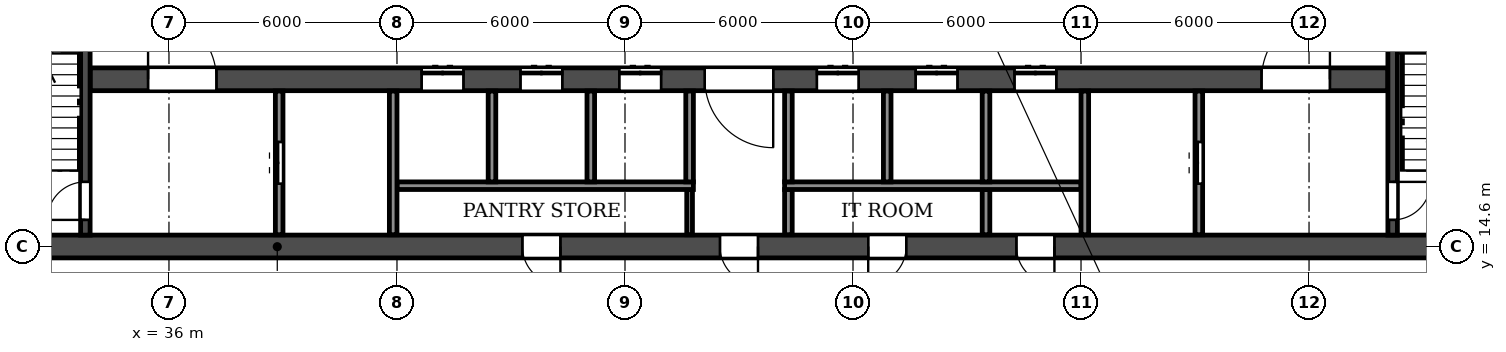
"""IFC4 building model, lengths in metres.
Left out: names, types, materials, properties, quantities, classifications, styles, units other than length and angle.
Written with IfcOpenShell. Run it as: python <this file> out.ifc"""

import sys

from ifc_helpers import new_model, si_unit, direction, frame, frame_2d, origin, place, context, subcontext, project, spatial, rectangle, extrude, element, fill, save


model = new_model("IFC4")
c1 = context("Model", 3, precision=1e-05, world=origin(), true_north=direction((0.0, 1.0)))
c2 = subcontext(c1, "Body", "Model", "MODEL_VIEW")
j1 = project(units=[si_unit("LENGTHUNIT", "METRE"), si_unit("PLANEANGLEUNIT", "RADIAN")], contexts=[c1])
p1 = place(None, origin())
s1 = spatial("IfcSite", under=j1, at=p1, CompositionType="ELEMENT")
p2 = place(p1, origin())
s2 = spatial("IfcBuilding", under=s1, at=p2, CompositionType="ELEMENT")
p3 = place(p2, frame((0.0, 0.0, 49.8)))
s3 = spatial("IfcBuildingStorey", under=s2, at=p3, CompositionType="ELEMENT", Elevation=49.8)
p4 = place(p3, frame((2.6, 14.6, 0.0), z_axis=(0.0, 0.0, 1.0), x_axis=(1.0, 0.0, 0.0)))
e1 = element("IfcWall", 1, at=p4, inside=s3, PredefinedType="SOLIDWALL", context=c2, shape_type="SweptSolid", body=[
    extrude(rectangle(XDim=96.8, YDim=0.6, at=frame_2d((48.4, 0.0))), origin(), (0.0, 0.0, 1.0), 3.0),
])
p5 = place(p4, frame((3.05, 0.0, 0.0)))
e2 = element("IfcOpeningElement", 2, at=p5, cuts=e1, PredefinedType="OPENING", context=c2, shape_type="SweptSolid", body=[
    extrude(rectangle(XDim=1.5, YDim=2.1, at=frame_2d((0.75, 1.05))), frame((0.0, 0.31, 0.0), z_axis=(0.0, -1.0, 0.0), x_axis=(1.0, 0.0, 0.0)), (0.0, 0.0, 1.0), 0.62),
])
p6 = place(p4, frame((10.75, 0.0, 0.0)))
e3 = element("IfcOpeningElement", 3, at=p6, cuts=e1, PredefinedType="OPENING", context=c2, shape_type="SweptSolid", body=[
    extrude(rectangle(XDim=1.5, YDim=2.1, at=frame_2d((0.75, 1.05))), frame((0.0, 0.31, 0.0), z_axis=(0.0, -1.0, 0.0), x_axis=(1.0, 0.0, 0.0)), (0.0, 0.0, 1.0), 0.62),
])
p7 = place(p4, frame((16.3, 0.0, 0.0)))
e4 = element("IfcOpeningElement", 4, at=p7, cuts=e1, PredefinedType="OPENING", context=c2, shape_type="SweptSolid", body=[
    extrude(rectangle(XDim=1.0, YDim=2.1, at=frame_2d((0.5, 1.05))), frame((0.0, 0.31, 0.0), z_axis=(0.0, -1.0, 0.0), x_axis=(1.0, 0.0, 0.0)), (0.0, 0.0, 1.0), 0.62),
])
p8 = place(p4, frame((24.2, 0.0, 0.0)))
e5 = element("IfcOpeningElement", 5, at=p8, cuts=e1, PredefinedType="OPENING", context=c2, shape_type="SweptSolid", body=[
    extrude(rectangle(XDim=1.0, YDim=2.1, at=frame_2d((0.5, 1.05))), frame((0.0, 0.31, 0.0), z_axis=(0.0, -1.0, 0.0), x_axis=(1.0, 0.0, 0.0)), (0.0, 0.0, 1.0), 0.62),
])
p9 = place(p4, frame((28.8, 0.0, 0.0)))
e6 = element("IfcOpeningElement", 6, at=p9, cuts=e1, PredefinedType="OPENING", context=c2, shape_type="SweptSolid", body=[
    extrude(rectangle(XDim=1.0, YDim=2.1, at=frame_2d((0.5, 1.05))), frame((0.0, 0.31, 0.0), z_axis=(0.0, -1.0, 0.0), x_axis=(1.0, 0.0, 0.0)), (0.0, 0.0, 1.0), 0.62),
])
p10 = place(p4, frame((42.7, 0.0, 0.0)))
e7 = element("IfcOpeningElement", 7, at=p10, cuts=e1, PredefinedType="OPENING", context=c2, shape_type="SweptSolid", body=[
    extrude(rectangle(XDim=1.0, YDim=2.1, at=frame_2d((0.5, 1.05))), frame((0.0, 0.31, 0.0), z_axis=(0.0, -1.0, 0.0), x_axis=(1.0, 0.0, 0.0)), (0.0, 0.0, 1.0), 0.62),
])
p11 = place(p4, frame((47.9, 0.0, 0.0)))
e8 = element("IfcOpeningElement", 8, at=p11, cuts=e1, PredefinedType="OPENING", context=c2, shape_type="SweptSolid", body=[
    extrude(rectangle(XDim=1.0, YDim=2.1, at=frame_2d((0.5, 1.05))), frame((0.0, 0.31, 0.0), z_axis=(0.0, -1.0, 0.0), x_axis=(1.0, 0.0, 0.0)), (0.0, 0.0, 1.0), 0.62),
])
p12 = place(p4, frame((51.8, 0.0, 0.0)))
e9 = element("IfcOpeningElement", 9, at=p12, cuts=e1, PredefinedType="OPENING", context=c2, shape_type="SweptSolid", body=[
    extrude(rectangle(XDim=1.0, YDim=2.1, at=frame_2d((0.5, 1.05))), frame((0.0, 0.31, 0.0), z_axis=(0.0, -1.0, 0.0), x_axis=(1.0, 0.0, 0.0)), (0.0, 0.0, 1.0), 0.62),
])
p13 = place(p4, frame((55.7, 0.0, 0.0)))
e10 = element("IfcOpeningElement", 10, at=p13, cuts=e1, PredefinedType="OPENING", context=c2, shape_type="SweptSolid", body=[
    extrude(rectangle(XDim=1.0, YDim=2.1, at=frame_2d((0.5, 1.05))), frame((0.0, 0.31, 0.0), z_axis=(0.0, -1.0, 0.0), x_axis=(1.0, 0.0, 0.0)), (0.0, 0.0, 1.0), 0.62),
])
p14 = place(p4, frame((67.0, 0.0, 0.0)))
e11 = element("IfcOpeningElement", 11, at=p14, cuts=e1, PredefinedType="OPENING", context=c2, shape_type="SweptSolid", body=[
    extrude(rectangle(XDim=1.0, YDim=2.1, at=frame_2d((0.5, 1.05))), frame((0.0, 0.31, 0.0), z_axis=(0.0, -1.0, 0.0), x_axis=(1.0, 0.0, 0.0)), (0.0, 0.0, 1.0), 0.62),
])
p15 = place(p4, frame((71.6, 0.0, 0.0)))
e12 = element("IfcOpeningElement", 12, at=p15, cuts=e1, PredefinedType="OPENING", context=c2, shape_type="SweptSolid", body=[
    extrude(rectangle(XDim=1.0, YDim=2.1, at=frame_2d((0.5, 1.05))), frame((0.0, 0.31, 0.0), z_axis=(0.0, -1.0, 0.0), x_axis=(1.0, 0.0, 0.0)), (0.0, 0.0, 1.0), 0.62),
])
p16 = place(p4, frame((79.5, 0.0, 0.0)))
e13 = element("IfcOpeningElement", 13, at=p16, cuts=e1, PredefinedType="OPENING", context=c2, shape_type="SweptSolid", body=[
    extrude(rectangle(XDim=1.0, YDim=2.1, at=frame_2d((0.5, 1.05))), frame((0.0, 0.31, 0.0), z_axis=(0.0, -1.0, 0.0), x_axis=(1.0, 0.0, 0.0)), (0.0, 0.0, 1.0), 0.62),
])
p17 = place(p4, frame((84.05, 0.0, 0.0)))
e14 = element("IfcOpeningElement", 14, at=p17, cuts=e1, PredefinedType="OPENING", context=c2, shape_type="SweptSolid", body=[
    extrude(rectangle(XDim=1.0, YDim=2.1, at=frame_2d((0.5, 1.05))), frame((0.0, 0.31, 0.0), z_axis=(0.0, -1.0, 0.0), x_axis=(1.0, 0.0, 0.0)), (0.0, 0.0, 1.0), 0.62),
])
p18 = place(p4, frame((91.75, 0.0, 0.0)))
e15 = element("IfcOpeningElement", 15, at=p18, cuts=e1, PredefinedType="OPENING", context=c2, shape_type="SweptSolid", body=[
    extrude(rectangle(XDim=1.0, YDim=2.1, at=frame_2d((0.5, 1.05))), frame((0.0, 0.31, 0.0), z_axis=(0.0, -1.0, 0.0), x_axis=(1.0, 0.0, 0.0)), (0.0, 0.0, 1.0), 0.62),
])
p19 = place(p3, frame((33.925, 19.0, 0.0), z_axis=(0.0, 0.0, 1.0), x_axis=(1.0, 0.0, 0.0)))
e16 = element("IfcWall", 16, at=p19, inside=s3, PredefinedType="SOLIDWALL", context=c2, shape_type="SweptSolid", body=[
    extrude(rectangle(XDim=34.15, YDim=0.6, at=frame_2d((17.075, 0.0))), origin(), (0.0, 0.0, 1.0), 3.0),
])
p20 = place(p19, frame((16.175, 0.0, 0.0)))
e17 = element("IfcOpeningElement", 17, at=p20, cuts=e16, PredefinedType="OPENING", context=c2, shape_type="SweptSolid", body=[
    extrude(rectangle(XDim=1.8, YDim=2.1, at=frame_2d((0.9, 1.05))), frame((0.0, 0.31, 0.0), z_axis=(0.0, -1.0, 0.0), x_axis=(1.0, 0.0, 0.0)), (0.0, 0.0, 1.0), 0.62),
])
p21 = place(p19, frame((1.525, 0.0, 0.0)))
e18 = element("IfcOpeningElement", 18, at=p21, cuts=e16, PredefinedType="OPENING", context=c2, shape_type="SweptSolid", body=[
    extrude(rectangle(XDim=1.8, YDim=2.1, at=frame_2d((0.9, 1.05))), frame((0.0, 0.31, 0.0), z_axis=(0.0, -1.0, 0.0), x_axis=(1.0, 0.0, 0.0)), (0.0, 0.0, 1.0), 0.62),
])
p22 = place(p19, frame((8.725, 0.0, 0.0)))
e19 = element("IfcOpeningElement", 19, at=p22, cuts=e16, PredefinedType="OPENING", context=c2, shape_type="SweptSolid", body=[
    extrude(rectangle(XDim=1.1, YDim=2.1, at=frame_2d((0.55, 1.05))), frame((0.0, 0.31, 0.0), z_axis=(0.0, -1.0, 0.0), x_axis=(1.0, 0.0, 0.0)), (0.0, 0.0, 1.0), 0.62),
])
p23 = place(p19, frame((11.325, 0.0, 0.0)))
e20 = element("IfcOpeningElement", 20, at=p23, cuts=e16, PredefinedType="OPENING", context=c2, shape_type="SweptSolid", body=[
    extrude(rectangle(XDim=1.1, YDim=2.1, at=frame_2d((0.55, 1.05))), frame((0.0, 0.31, 0.0), z_axis=(0.0, -1.0, 0.0), x_axis=(1.0, 0.0, 0.0)), (0.0, 0.0, 1.0), 0.62),
])
p24 = place(p19, frame((13.925, 0.0, 0.0)))
e21 = element("IfcOpeningElement", 21, at=p24, cuts=e16, PredefinedType="OPENING", context=c2, shape_type="SweptSolid", body=[
    extrude(rectangle(XDim=1.1, YDim=2.1, at=frame_2d((0.55, 1.05))), frame((0.0, 0.31, 0.0), z_axis=(0.0, -1.0, 0.0), x_axis=(1.0, 0.0, 0.0)), (0.0, 0.0, 1.0), 0.62),
])
p25 = place(p19, frame((19.125, 0.0, 0.0)))
e22 = element("IfcOpeningElement", 22, at=p25, cuts=e16, PredefinedType="OPENING", context=c2, shape_type="SweptSolid", body=[
    extrude(rectangle(XDim=1.1, YDim=2.1, at=frame_2d((0.55, 1.05))), frame((0.0, 0.31, 0.0), z_axis=(0.0, -1.0, 0.0), x_axis=(1.0, 0.0, 0.0)), (0.0, 0.0, 1.0), 0.62),
])
p26 = place(p19, frame((21.725, 0.0, 0.0)))
e23 = element("IfcOpeningElement", 23, at=p26, cuts=e16, PredefinedType="OPENING", context=c2, shape_type="SweptSolid", body=[
    extrude(rectangle(XDim=1.1, YDim=2.1, at=frame_2d((0.55, 1.05))), frame((0.0, 0.31, 0.0), z_axis=(0.0, -1.0, 0.0), x_axis=(1.0, 0.0, 0.0)), (0.0, 0.0, 1.0), 0.62),
])
p27 = place(p19, frame((24.325, 0.0, 0.0)))
e24 = element("IfcOpeningElement", 24, at=p27, cuts=e16, PredefinedType="OPENING", context=c2, shape_type="SweptSolid", body=[
    extrude(rectangle(XDim=1.1, YDim=2.1, at=frame_2d((0.55, 1.05))), frame((0.0, 0.31, 0.0), z_axis=(0.0, -1.0, 0.0), x_axis=(1.0, 0.0, 0.0)), (0.0, 0.0, 1.0), 0.62),
])
p28 = place(p19, frame((30.825, 0.0, 0.0)))
e25 = element("IfcOpeningElement", 25, at=p28, cuts=e16, PredefinedType="OPENING", context=c2, shape_type="SweptSolid", body=[
    extrude(rectangle(XDim=1.8, YDim=2.1, at=frame_2d((0.9, 1.05))), frame((0.0, 0.31, 0.0), z_axis=(0.0, -1.0, 0.0), x_axis=(1.0, 0.0, 0.0)), (0.0, 0.0, 1.0), 0.62),
])
p29 = place(p3, frame((33.8, 14.9, 0.0), z_axis=(0.0, 0.0, 1.0), x_axis=(0.0, 1.0, 0.0)))
e26 = element("IfcWall", 26, at=p29, inside=s3, PredefinedType="SOLIDWALL", context=c2, shape_type="SweptSolid", body=[
    extrude(rectangle(XDim=7.575, YDim=0.25, at=frame_2d((3.788, 0.0))), origin(), (0.0, 0.0, 1.0), 3.0),
])
p30 = place(p29, frame((0.4, 0.0, 0.0)))
e27 = element("IfcOpeningElement", 27, at=p30, cuts=e26, PredefinedType="OPENING", context=c2, shape_type="SweptSolid", body=[
    extrude(rectangle(XDim=1.0, YDim=2.1, at=frame_2d((0.5, 1.05))), frame((0.0, 0.135, 0.0), z_axis=(0.0, -1.0, 0.0), x_axis=(1.0, 0.0, 0.0)), (0.0, 0.0, 1.0), 0.27),
])
p31 = place(p3, frame((68.2, 14.9, 0.0), z_axis=(0.0, 0.0, 1.0), x_axis=(0.0, 1.0, 0.0)))
e28 = element("IfcWall", 28, at=p31, inside=s3, PredefinedType="SOLIDWALL", context=c2, shape_type="SweptSolid", body=[
    extrude(rectangle(XDim=7.575, YDim=0.25, at=frame_2d((3.788, 0.0))), origin(), (0.0, 0.0, 1.0), 3.0),
])
p32 = place(p31, frame((0.4, 0.0, 0.0)))
e29 = element("IfcOpeningElement", 29, at=p32, cuts=e28, PredefinedType="OPENING", context=c2, shape_type="SweptSolid", body=[
    extrude(rectangle(XDim=1.0, YDim=2.1, at=frame_2d((0.5, 1.05))), frame((0.0, 0.135, 0.0), z_axis=(0.0, -1.0, 0.0), x_axis=(1.0, 0.0, 0.0)), (0.0, 0.0, 1.0), 0.27),
])
p33 = place(p3, frame((49.7, 14.91, 0.0), z_axis=(0.0, 0.0, 1.0), x_axis=(0.0, 1.0, 0.0)))
e30 = element("IfcWall", 30, at=p33, inside=s3, PredefinedType="PARTITIONING", context=c2, shape_type="SweptSolid", body=[
    extrude(rectangle(XDim=1.19, YDim=0.15, at=frame_2d((0.595, 0.0))), origin(), (0.0, 0.0, 1.0), 3.0),
])
for number, where, z_axis, x_axis in (
    (31, (52.3, 14.91, 0.0), (0.0, 0.0, 1.0), (0.0, 1.0, 0.0)),
    (32, (57.5, 14.91, 0.0), (0.0, 0.0, 1.0), (0.0, 1.0, 0.0)),
):
    element("IfcWall", number, at=place(p3, frame(where, z_axis=z_axis, x_axis=x_axis)), inside=s3, PredefinedType="PARTITIONING", context=c2, shape_type="SweptSolid", body=[
        extrude(rectangle(XDim=1.19, YDim=0.2, at=frame_2d((0.595, 0.0))), origin(), (0.0, 0.0, 1.0), 3.0),
    ])
for number, where, z_axis, x_axis in (
    (33, (42.0, 16.2, 0.0), (0.0, 0.0, 1.0), (1.0, 0.0, 0.0)),
    (34, (52.2, 16.2, 0.0), (0.0, 0.0, 1.0), (1.0, 0.0, 0.0)),
):
    element("IfcWall", number, at=place(p3, frame(where, z_axis=z_axis, x_axis=x_axis)), inside=s3, PredefinedType="PARTITIONING", context=c2, shape_type="SweptSolid", body=[
        extrude(rectangle(XDim=7.8, YDim=0.2, at=frame_2d((3.9, 0.0))), origin(), (0.0, 0.0, 1.0), 3.0),
    ])
p34 = place(p3, frame((38.9, 14.91, 0.0), z_axis=(0.0, 0.0, 1.0), x_axis=(0.0, 1.0, 0.0)))
e35 = element("IfcWall", 35, at=p34, inside=s3, PredefinedType="PARTITIONING", context=c2, shape_type="SweptSolid", body=[
    extrude(rectangle(XDim=3.78, YDim=0.2, at=frame_2d((1.89, 0.0))), origin(), (0.0, 0.0, 1.0), 3.0),
])
p35 = place(p34, frame((1.34, 0.0, 0.0)))
e36 = element("IfcOpeningElement", 36, at=p35, cuts=e35, PredefinedType="OPENING", context=c2, shape_type="SweptSolid", body=[
    extrude(rectangle(XDim=1.1, YDim=2.1, at=frame_2d((0.55, 1.05))), frame((0.0, 0.11, 0.0), z_axis=(0.0, -1.0, 0.0), x_axis=(1.0, 0.0, 0.0)), (0.0, 0.0, 1.0), 0.22),
])
p36 = place(p3, frame((41.9, 14.91, 0.0), z_axis=(0.0, 0.0, 1.0), x_axis=(0.0, 1.0, 0.0)))
e37 = element("IfcWall", 37, at=p36, inside=s3, PredefinedType="PARTITIONING", context=c2, shape_type="SweptSolid", body=[
    extrude(rectangle(XDim=3.78, YDim=0.2, at=frame_2d((1.89, 0.0))), origin(), (0.0, 0.0, 1.0), 3.0),
])
for number, where, z_axis, x_axis in (
    (38, (44.5, 16.3, 0.0), (0.0, 0.0, 1.0), (0.0, 1.0, 0.0)),
    (39, (47.1, 16.3, 0.0), (0.0, 0.0, 1.0), (0.0, 1.0, 0.0)),
    (40, (49.7, 16.3, 0.0), (0.0, 0.0, 1.0), (0.0, 1.0, 0.0)),
    (41, (52.3, 16.3, 0.0), (0.0, 0.0, 1.0), (0.0, 1.0, 0.0)),
    (42, (54.9, 16.3, 0.0), (0.0, 0.0, 1.0), (0.0, 1.0, 0.0)),
    (43, (57.5, 16.3, 0.0), (0.0, 0.0, 1.0), (0.0, 1.0, 0.0)),
):
    element("IfcWall", number, at=place(p3, frame(where, z_axis=z_axis, x_axis=x_axis)), inside=s3, PredefinedType="PARTITIONING", context=c2, shape_type="SweptSolid", body=[
        extrude(rectangle(XDim=2.39, YDim=0.2, at=frame_2d((1.195, 0.0))), origin(), (0.0, 0.0, 1.0), 3.0),
    ])
p37 = place(p3, frame((60.1, 14.91, 0.0), z_axis=(0.0, 0.0, 1.0), x_axis=(0.0, 1.0, 0.0)))
e44 = element("IfcWall", 44, at=p37, inside=s3, PredefinedType="PARTITIONING", context=c2, shape_type="SweptSolid", body=[
    extrude(rectangle(XDim=3.78, YDim=0.2, at=frame_2d((1.89, 0.0))), origin(), (0.0, 0.0, 1.0), 3.0),
])
p38 = place(p3, frame((63.1, 14.91, 0.0), z_axis=(0.0, 0.0, 1.0), x_axis=(0.0, 1.0, 0.0)))
e45 = element("IfcWall", 45, at=p38, inside=s3, PredefinedType="PARTITIONING", context=c2, shape_type="SweptSolid", body=[
    extrude(rectangle(XDim=3.78, YDim=0.2, at=frame_2d((1.89, 0.0))), origin(), (0.0, 0.0, 1.0), 3.0),
])
p39 = place(p38, frame((1.34, 0.0, 0.0)))
e46 = element("IfcOpeningElement", 46, at=p39, cuts=e45, PredefinedType="OPENING", context=c2, shape_type="SweptSolid", body=[
    extrude(rectangle(XDim=1.1, YDim=2.1, at=frame_2d((0.55, 1.05))), frame((0.0, 0.11, 0.0), z_axis=(0.0, -1.0, 0.0), x_axis=(1.0, 0.0, 0.0)), (0.0, 0.0, 1.0), 0.22),
])
p40 = place(p10, frame((1.0, 0.0, 0.0), z_axis=(0.0, 0.0, 1.0), x_axis=(-1.0, 0.0, 0.0)))
e47 = element("IfcDoor", 47, at=p40, inside=s3, OperationType="SINGLE_SWING_LEFT", PredefinedType="DOOR", context=c2, shape_type="SweptSolid", body=[
    extrude(rectangle(XDim=1.0, YDim=2.1, at=frame_2d((0.5, 1.05))), frame((0.0, 0.025, 0.0), z_axis=(0.0, -1.0, 0.0), x_axis=(1.0, 0.0, 0.0)), (0.0, 0.0, 1.0), 0.05),
])
fill(e7, e47)
p41 = place(p11, frame((1.0, 0.0, 0.0), z_axis=(0.0, 0.0, 1.0), x_axis=(-1.0, 0.0, 0.0)))
e48 = element("IfcDoor", 48, at=p41, inside=s3, OperationType="SINGLE_SWING_LEFT", PredefinedType="DOOR", context=c2, shape_type="SweptSolid", body=[
    extrude(rectangle(XDim=1.0, YDim=2.1, at=frame_2d((0.5, 1.05))), frame((0.0, 0.025, 0.0), z_axis=(0.0, -1.0, 0.0), x_axis=(1.0, 0.0, 0.0)), (0.0, 0.0, 1.0), 0.05),
])
fill(e8, e48)
p42 = place(p12, frame((1.0, 0.0, 0.0), z_axis=(0.0, 0.0, 1.0), x_axis=(-1.0, 0.0, 0.0)))
e49 = element("IfcDoor", 49, at=p42, inside=s3, OperationType="SINGLE_SWING_RIGHT", PredefinedType="DOOR", context=c2, shape_type="SweptSolid", body=[
    extrude(rectangle(XDim=1.0, YDim=2.1, at=frame_2d((0.5, 1.05))), frame((0.0, 0.025, 0.0), z_axis=(0.0, -1.0, 0.0), x_axis=(1.0, 0.0, 0.0)), (0.0, 0.0, 1.0), 0.05),
])
fill(e9, e49)
p43 = place(p13, frame((1.0, 0.0, 0.0), z_axis=(0.0, 0.0, 1.0), x_axis=(-1.0, 0.0, 0.0)))
e50 = element("IfcDoor", 50, at=p43, inside=s3, OperationType="SINGLE_SWING_LEFT", PredefinedType="DOOR", context=c2, shape_type="SweptSolid", body=[
    extrude(rectangle(XDim=1.0, YDim=2.1, at=frame_2d((0.5, 1.05))), frame((0.0, 0.025, 0.0), z_axis=(0.0, -1.0, 0.0), x_axis=(1.0, 0.0, 0.0)), (0.0, 0.0, 1.0), 0.05),
])
fill(e10, e50)
p44 = place(p39, origin())
e51 = element("IfcDoor", 51, at=p44, inside=s3, OperationType="DOUBLE_DOOR_SLIDING", PredefinedType="DOOR", context=c2, shape_type="SweptSolid", body=[
    extrude(rectangle(XDim=1.1, YDim=2.1, at=frame_2d((0.55, 1.05))), frame((0.0, 0.025, 0.0), z_axis=(0.0, -1.0, 0.0), x_axis=(1.0, 0.0, 0.0)), (0.0, 0.0, 1.0), 0.05),
])
fill(e46, e51)
p45 = place(p32, frame((1.0, 0.0, 0.0), z_axis=(0.0, 0.0, 1.0), x_axis=(-1.0, 0.0, 0.0)))
e52 = element("IfcDoor", 52, at=p45, inside=s3, OperationType="SINGLE_SWING_LEFT", PredefinedType="DOOR", context=c2, shape_type="SweptSolid", body=[
    extrude(rectangle(XDim=1.0, YDim=2.1, at=frame_2d((0.5, 1.05))), frame((0.0, 0.025, 0.0), z_axis=(0.0, -1.0, 0.0), x_axis=(1.0, 0.0, 0.0)), (0.0, 0.0, 1.0), 0.05),
])
fill(e29, e52)
p46 = place(p30, origin())
e53 = element("IfcDoor", 53, at=p46, inside=s3, OperationType="SINGLE_SWING_LEFT", PredefinedType="DOOR", context=c2, shape_type="SweptSolid", body=[
    extrude(rectangle(XDim=1.0, YDim=2.1, at=frame_2d((0.5, 1.05))), frame((0.0, 0.025, 0.0), z_axis=(0.0, -1.0, 0.0), x_axis=(1.0, 0.0, 0.0)), (0.0, 0.0, 1.0), 0.05),
])
fill(e27, e53)
p47 = place(p35, origin())
e54 = element("IfcDoor", 54, at=p47, inside=s3, OperationType="DOUBLE_DOOR_SLIDING", PredefinedType="DOOR", context=c2, shape_type="SweptSolid", body=[
    extrude(rectangle(XDim=1.1, YDim=2.1, at=frame_2d((0.55, 1.05))), frame((0.0, 0.025, 0.0), z_axis=(0.0, -1.0, 0.0), x_axis=(1.0, 0.0, 0.0)), (0.0, 0.0, 1.0), 0.05),
])
fill(e36, e54)
p48 = place(p20, frame((1.8, 0.0, 0.0), z_axis=(0.0, 0.0, 1.0), x_axis=(-1.0, 0.0, 0.0)))
e55 = element("IfcDoor", 55, at=p48, inside=s3, OperationType="DOUBLE_DOOR_SINGLE_SWING", PredefinedType="DOOR", context=c2, shape_type="SweptSolid", body=[
    extrude(rectangle(XDim=1.8, YDim=2.1, at=frame_2d((0.9, 1.05))), frame((0.0, 0.025, 0.0), z_axis=(0.0, -1.0, 0.0), x_axis=(1.0, 0.0, 0.0)), (0.0, 0.0, 1.0), 0.05),
])
fill(e17, e55)
p49 = place(p21, origin())
e56 = element("IfcDoor", 56, at=p49, inside=s3, OperationType="DOUBLE_DOOR_SINGLE_SWING", PredefinedType="DOOR", context=c2, shape_type="SweptSolid", body=[
    extrude(rectangle(XDim=1.8, YDim=2.1, at=frame_2d((0.9, 1.05))), frame((0.0, 0.025, 0.0), z_axis=(0.0, -1.0, 0.0), x_axis=(1.0, 0.0, 0.0)), (0.0, 0.0, 1.0), 0.05),
])
fill(e18, e56)
p50 = place(p22, origin())
e57 = element("IfcDoor", 57, at=p50, inside=s3, OperationType="DOUBLE_DOOR_SLIDING", PredefinedType="DOOR", context=c2, shape_type="SweptSolid", body=[
    extrude(rectangle(XDim=1.1, YDim=2.1, at=frame_2d((0.55, 1.05))), frame((0.0, 0.025, 0.0), z_axis=(0.0, -1.0, 0.0), x_axis=(1.0, 0.0, 0.0)), (0.0, 0.0, 1.0), 0.05),
])
fill(e19, e57)
p51 = place(p23, origin())
e58 = element("IfcDoor", 58, at=p51, inside=s3, OperationType="DOUBLE_DOOR_SLIDING", PredefinedType="DOOR", context=c2, shape_type="SweptSolid", body=[
    extrude(rectangle(XDim=1.1, YDim=2.1, at=frame_2d((0.55, 1.05))), frame((0.0, 0.025, 0.0), z_axis=(0.0, -1.0, 0.0), x_axis=(1.0, 0.0, 0.0)), (0.0, 0.0, 1.0), 0.05),
])
fill(e20, e58)
p52 = place(p24, origin())
e59 = element("IfcDoor", 59, at=p52, inside=s3, OperationType="DOUBLE_DOOR_SLIDING", PredefinedType="DOOR", context=c2, shape_type="SweptSolid", body=[
    extrude(rectangle(XDim=1.1, YDim=2.1, at=frame_2d((0.55, 1.05))), frame((0.0, 0.025, 0.0), z_axis=(0.0, -1.0, 0.0), x_axis=(1.0, 0.0, 0.0)), (0.0, 0.0, 1.0), 0.05),
])
fill(e21, e59)
p53 = place(p25, origin())
e60 = element("IfcDoor", 60, at=p53, inside=s3, OperationType="DOUBLE_DOOR_SLIDING", PredefinedType="DOOR", context=c2, shape_type="SweptSolid", body=[
    extrude(rectangle(XDim=1.1, YDim=2.1, at=frame_2d((0.55, 1.05))), frame((0.0, 0.025, 0.0), z_axis=(0.0, -1.0, 0.0), x_axis=(1.0, 0.0, 0.0)), (0.0, 0.0, 1.0), 0.05),
])
fill(e22, e60)
p54 = place(p26, origin())
e61 = element("IfcDoor", 61, at=p54, inside=s3, OperationType="DOUBLE_DOOR_SLIDING", PredefinedType="DOOR", context=c2, shape_type="SweptSolid", body=[
    extrude(rectangle(XDim=1.1, YDim=2.1, at=frame_2d((0.55, 1.05))), frame((0.0, 0.025, 0.0), z_axis=(0.0, -1.0, 0.0), x_axis=(1.0, 0.0, 0.0)), (0.0, 0.0, 1.0), 0.05),
])
fill(e23, e61)
p55 = place(p27, origin())
e62 = element("IfcDoor", 62, at=p55, inside=s3, OperationType="DOUBLE_DOOR_SLIDING", PredefinedType="DOOR", context=c2, shape_type="SweptSolid", body=[
    extrude(rectangle(XDim=1.1, YDim=2.1, at=frame_2d((0.55, 1.05))), frame((0.0, 0.025, 0.0), z_axis=(0.0, -1.0, 0.0), x_axis=(1.0, 0.0, 0.0)), (0.0, 0.0, 1.0), 0.05),
])
fill(e24, e62)
p56 = place(p28, origin())
e63 = element("IfcDoor", 63, at=p56, inside=s3, OperationType="DOUBLE_DOOR_SINGLE_SWING", PredefinedType="DOOR", context=c2, shape_type="SweptSolid", body=[
    extrude(rectangle(XDim=1.8, YDim=2.1, at=frame_2d((0.9, 1.05))), frame((0.0, 0.025, 0.0), z_axis=(0.0, -1.0, 0.0), x_axis=(1.0, 0.0, 0.0)), (0.0, 0.0, 1.0), 0.05),
])
fill(e25, e63)
save(model, sys.argv[1])
